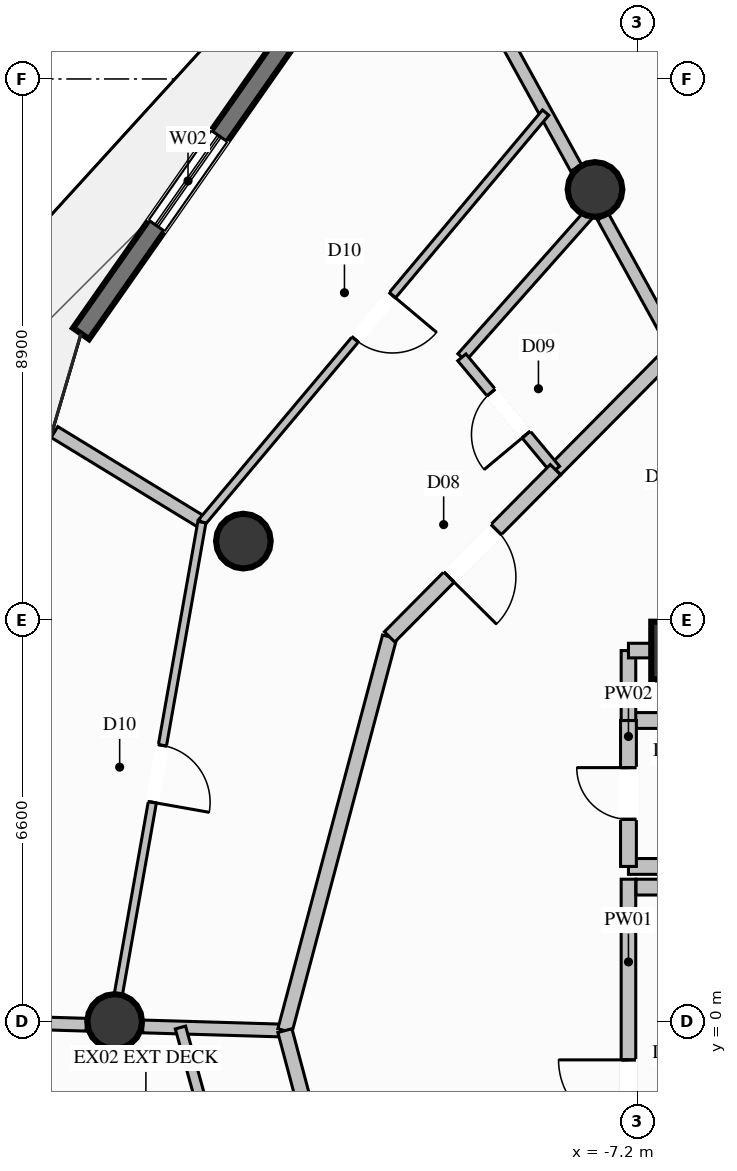
"""IFC4 building model, lengths in metres.
Left out: names, types, materials, properties, quantities, classifications, styles, units other than length and angle.
Written with IfcOpenShell. Run it as: python <this file> out.ifc"""

import sys

from ifc_helpers import new_model, si_unit, direction, frame, frame_2d, origin, origin_2d, place, context, subcontext, project, spatial, rectangle, circle, extrude, element, fill, save


model = new_model("IFC4")
c1 = context("Model", 3, precision=1e-05, world=origin(), true_north=direction((0.0, 1.0)))
c2 = subcontext(c1, "Body", "Model", "MODEL_VIEW")
j1 = project(units=[si_unit("LENGTHUNIT", "METRE"), si_unit("PLANEANGLEUNIT", "RADIAN")], contexts=[c1])
p1 = place(None, origin())
s1 = spatial("IfcSite", under=j1, at=p1, CompositionType="ELEMENT")
p2 = place(p1, origin())
s2 = spatial("IfcBuilding", under=s1, at=p2, CompositionType="ELEMENT")
p3 = place(p2, frame((0.0, 0.0, 205.6)))
s3 = spatial("IfcBuildingStorey", under=s2, at=p3, CompositionType="ELEMENT", Elevation=205.6)
p4 = place(p3, frame((-6.5, 6.1, 0.0), z_axis=(0.0, 0.0, 1.0), x_axis=(1.0, 0.0, 0.0)))
e1 = element("IfcColumn", 1, at=p4, inside=s3, PredefinedType="COLUMN", context=c2, shape_type="SweptSolid", body=[
    extrude(rectangle(XDim=0.95, YDim=0.95, at=origin_2d()), origin(), (0.0, 0.0, 1.0), 3.6),
])
for number, where, z_axis, x_axis in (
    (2, (-7.9, 13.683, 0.0), (0.0, 0.0, 1.0), (1.0, 0.0, 0.0)),
    (3, (-13.683, 7.9, 0.0), (0.0, 0.0, 1.0), (1.0, 0.0, 0.0)),
    (4, (-15.8, 0.0, 0.0), (0.0, 0.0, 1.0), (1.0, 0.0, 0.0)),
):
    element("IfcColumn", number, at=place(p3, frame(where, z_axis=z_axis, x_axis=x_axis)), inside=s3, PredefinedType="COLUMN", context=c2, shape_type="SweptSolid", body=[
        extrude(circle(Radius=0.45, at=origin_2d()), origin(), (0.0, 0.0, 1.0), 3.6),
    ])
p5 = place(p3, frame((-16.353, 11.313, 0.0), z_axis=(0.0, 0.0, 1.0), x_axis=(0.573863076695, 0.818951261802, 0.0)))
e5 = element("IfcWall", 5, at=p5, inside=s3, PredefinedType="SOLIDWALL", context=c2, shape_type="SweptSolid", body=[
    extrude(rectangle(XDim=6.132, YDim=0.32, at=frame_2d((3.066, 0.0))), origin(), (0.0, 0.0, 1.0), 3.36),
])
p6 = place(p5, frame((2.166, 0.0, 0.35)))
e6 = element("IfcOpeningElement", 6, at=p6, cuts=e5, PredefinedType="OPENING", context=c2, shape_type="SweptSolid", body=[
    extrude(rectangle(XDim=1.8, YDim=2.6, at=frame_2d((0.9, 1.3))), frame((0.0, 0.17, 0.0), z_axis=(0.0, -1.0, 0.0), x_axis=(1.0, 0.0, 0.0)), (0.0, 0.0, 1.0), 0.34),
])
p7 = place(p3, frame((-7.35, -3.38, 0.0), z_axis=(0.0, 0.0, 1.0), x_axis=(0.0, 1.0, 0.0)))
e7 = element("IfcWall", 7, at=p7, inside=s3, PredefinedType="PARTITIONING", context=c2, shape_type="SweptSolid", body=[
    extrude(rectangle(XDim=5.72, YDim=0.24, at=frame_2d((2.86, 0.0))), origin(), (0.0, 0.0, 1.0), 2.445),
])
p8 = place(p7, frame((1.599, 0.0, 0.0)))
e8 = element("IfcOpeningElement", 8, at=p8, cuts=e7, PredefinedType="OPENING", context=c2, shape_type="SweptSolid", body=[
    extrude(rectangle(XDim=1.15, YDim=2.2, at=frame_2d((0.575, 1.1))), frame((0.0, 0.13, 0.0), z_axis=(0.0, -1.0, 0.0), x_axis=(1.0, 0.0, 0.0)), (0.0, 0.0, 1.0), 0.26),
])
p9 = place(p3, frame((-7.225, 2.21, 0.0), z_axis=(0.0, 0.0, 1.0), x_axis=(1.0, 0.0, 0.0)))
e9 = element("IfcWall", 9, at=p9, inside=s3, PredefinedType="PARTITIONING", context=c2, shape_type="SweptSolid", body=[
    extrude(rectangle(XDim=0.875, YDim=0.26, at=frame_2d((0.438, 0.0))), origin(), (0.0, 0.0, 1.0), 3.36),
])
for number, where, z_axis, x_axis in (
    (10, (-7.35, 4.95, 0.0), (0.0, 0.0, 1.0), (1.0, 0.0, 0.0)),
    (11, (-7.35, 2.55, 0.0), (0.0, 0.0, 1.0), (1.0, 0.0, 0.0)),
):
    element("IfcWall", number, at=place(p3, frame(where, z_axis=z_axis, x_axis=x_axis)), inside=s3, PredefinedType="PARTITIONING", context=c2, shape_type="SweptSolid", body=[
        extrude(rectangle(XDim=0.93, YDim=0.26, at=frame_2d((0.465, 0.0))), origin(), (0.0, 0.0, 1.0), 3.36),
    ])
p10 = place(p3, frame((-7.35, 2.55, 0.0), z_axis=(0.0, 0.0, 1.0), x_axis=(0.0, 1.0, 0.0)))
e12 = element("IfcWall", 12, at=p10, inside=s3, PredefinedType="PARTITIONING", context=c2, shape_type="SweptSolid", body=[
    extrude(rectangle(XDim=2.4, YDim=0.26, at=frame_2d((1.2, 0.0))), origin(), (0.0, 0.0, 1.0), 2.445),
])
p11 = place(p10, frame((0.775, 0.0, 0.0)))
e13 = element("IfcOpeningElement", 13, at=p11, cuts=e12, PredefinedType="OPENING", context=c2, shape_type="SweptSolid", body=[
    extrude(rectangle(XDim=0.85, YDim=2.05, at=frame_2d((0.425, 1.025))), frame((0.0, 0.14, 0.0), z_axis=(0.0, -1.0, 0.0), x_axis=(1.0, 0.0, 0.0)), (0.0, 0.0, 1.0), 0.28),
])
p12 = place(p3, frame((-7.35, 4.95, 0.0), z_axis=(0.0, 0.0, 1.0), x_axis=(0.0, 1.0, 0.0)))
e14 = element("IfcWall", 14, at=p12, inside=s3, PredefinedType="PARTITIONING", context=c2, shape_type="SweptSolid", body=[
    extrude(rectangle(XDim=1.15, YDim=0.24, at=frame_2d((0.575, 0.0))), origin(), (0.0, 0.0, 1.0), 2.445),
])
p13 = place(p3, frame((-7.35, 6.1, 0.0), z_axis=(0.0, 0.0, 1.0), x_axis=(1.0, 0.0, 0.0)))
e15 = element("IfcWall", 15, at=p13, inside=s3, PredefinedType="PARTITIONING", context=c2, shape_type="SweptSolid", body=[
    extrude(rectangle(XDim=0.85, YDim=0.24, at=frame_2d((0.425, 0.0))), origin(), (0.0, 0.0, 1.0), 2.877),
])
p14 = place(p3, frame((-6.575, 11.065, 0.0), z_axis=(0.0, 0.0, 1.0), x_axis=(-0.482312715348, 0.875999112222, 0.0)))
e16 = element("IfcWall", 16, at=p14, inside=s3, PredefinedType="PARTITIONING", context=c2, shape_type="SweptSolid", body=[
    extrude(rectangle(XDim=2.474, YDim=0.21, at=frame_2d((1.237, 0.0))), origin(), (0.0, 0.0, 1.0), 2.877),
])
p15 = place(p3, frame((-8.21, 14.036, 0.0), z_axis=(0.0, 0.0, 1.0), x_axis=(-0.482343563711, 0.875982126842, 0.0)))
e17 = element("IfcWall", 17, at=p15, inside=s3, PredefinedType="PARTITIONING", context=c2, shape_type="SweptSolid", body=[
    extrude(rectangle(XDim=4.522, YDim=0.21, at=frame_2d((2.261, 0.0))), origin(), (0.0, 0.0, 1.0), 3.36),
])
p16 = place(p3, frame((-13.0, -0.15, 0.0), z_axis=(0.0, 0.0, 1.0), x_axis=(-0.999566309164, 0.029448150771, 0.0)))
e18 = element("IfcWall", 18, at=p16, inside=s3, PredefinedType="PARTITIONING", context=c2, shape_type="SweptSolid", body=[
    extrude(rectangle(XDim=2.338, YDim=0.21, at=frame_2d((1.169, 0.0))), origin(), (0.0, 0.0, 1.0), 3.36),
])
p17 = place(p3, frame((-16.267, -0.053, 0.0), z_axis=(0.0, 0.0, 1.0), x_axis=(-0.999560281957, 0.029652027503, 0.0)))
e19 = element("IfcWall", 19, at=p17, inside=s3, PredefinedType="PARTITIONING", context=c2, shape_type="SweptSolid", body=[
    extrude(rectangle(XDim=1.787, YDim=0.21, at=frame_2d((0.893, 0.0))), origin(), (0.0, 0.0, 1.0), 3.36),
])
p18 = place(p3, frame((-6.575, 11.065, 0.0), z_axis=(0.0, 0.0, 1.0), x_axis=(-0.704271845888, -0.709930395947, 0.0)))
e20 = element("IfcWall", 20, at=p18, inside=s3, PredefinedType="PARTITIONING", context=c2, shape_type="SweptSolid", body=[
    extrude(rectangle(XDim=2.804, YDim=0.24, at=frame_2d((1.402, 0.0))), origin(), (0.0, 0.0, 1.0), 3.36),
])
p19 = place(p3, frame((-7.872, 13.422, 0.0), z_axis=(0.0, 0.0, 1.0), x_axis=(-0.663660752153, -0.748033693126, 0.0)))
e21 = element("IfcWall", 21, at=p19, inside=s3, PredefinedType="PLUMBINGWALL", context=c2, shape_type="SweptSolid", body=[
    extrude(rectangle(XDim=3.342, YDim=0.175, at=frame_2d((1.671, 0.0))), origin(), (0.0, 0.0, 1.0), 2.929),
])
p20 = place(p3, frame((-8.55, 9.074, 0.0), z_axis=(0.0, 0.0, 1.0), x_axis=(-0.640164435278, 0.768237916147, 0.0)))
e22 = element("IfcWall", 22, at=p20, inside=s3, PredefinedType="PLUMBINGWALL", context=c2, shape_type="SweptSolid", body=[
    extrude(rectangle(XDim=2.406, YDim=0.175, at=frame_2d((1.203, 0.0))), origin(), (0.0, 0.0, 1.0), 3.36),
])
p21 = place(p20, frame((0.753, 0.0, 0.0)))
e23 = element("IfcOpeningElement", 23, at=p21, cuts=e22, PredefinedType="OPENING", context=c2, shape_type="SweptSolid", body=[
    extrude(rectangle(XDim=0.9, YDim=2.1, at=frame_2d((0.45, 1.05))), frame((0.0, 0.098, 0.0), z_axis=(0.0, -1.0, 0.0), x_axis=(1.0, 0.0, 0.0)), (0.0, 0.0, 1.0), 0.195),
])
p22 = place(p3, frame((-14.365, 8.212, 0.0), z_axis=(0.0, 0.0, 1.0), x_axis=(-0.853249981301, 0.521502127905, 0.0)))
e24 = element("IfcWall", 24, at=p22, inside=s3, PredefinedType="PARTITIONING", context=c2, shape_type="SweptSolid", body=[
    extrude(rectangle(XDim=2.842, YDim=0.21, at=frame_2d((1.421, 0.0))), origin(), (0.0, 0.0, 1.0), 3.36),
])
p23 = place(p3, frame((-11.278, 6.325, 0.0), z_axis=(0.0, 0.0, 1.0), x_axis=(-0.257007135557, -0.966409505475, 0.0)))
e25 = element("IfcWall", 25, at=p23, inside=s3, PredefinedType="PARTITIONING", context=c2, shape_type="SweptSolid", body=[
    extrude(rectangle(XDim=6.7, YDim=0.24, at=frame_2d((3.35, 0.0))), origin(), (0.0, 0.0, 1.0), 3.36),
])
p24 = place(p3, frame((-8.55, 9.074, 0.0), z_axis=(0.0, 0.0, 1.0), x_axis=(-0.704390934975, -0.709812236246, 0.0)))
e26 = element("IfcWall", 26, at=p24, inside=s3, PredefinedType="PARTITIONING", context=c2, shape_type="SweptSolid", body=[
    extrude(rectangle(XDim=3.873, YDim=0.24, at=frame_2d((1.937, 0.0))), origin(), (0.0, 0.0, 1.0), 3.36),
])
p25 = place(p24, frame((1.386, 0.0, 0.0)))
e27 = element("IfcOpeningElement", 27, at=p25, cuts=e26, PredefinedType="OPENING", context=c2, shape_type="SweptSolid", body=[
    extrude(rectangle(XDim=1.1, YDim=2.3, at=frame_2d((0.55, 1.15))), frame((0.0, 0.13, 0.0), z_axis=(0.0, -1.0, 0.0), x_axis=(1.0, 0.0, 0.0)), (0.0, 0.0, 1.0), 0.26),
])
p26 = place(p3, frame((-8.712, 14.947, 0.0), z_axis=(0.0, 0.0, 1.0), x_axis=(-0.642897719882, -0.765952036208, 0.0)))
e28 = element("IfcWall", 28, at=p26, inside=s3, PredefinedType="PARTITIONING", context=c2, shape_type="SweptSolid", body=[
    extrude(rectangle(XDim=8.793, YDim=0.135, at=frame_2d((4.396, 0.0))), origin(), (0.0, 0.0, 1.0), 3.36),
])
p27 = place(p26, frame((3.921, 0.0, 0.0)))
e29 = element("IfcOpeningElement", 29, at=p27, cuts=e28, PredefinedType="OPENING", context=c2, shape_type="SweptSolid", body=[
    extrude(rectangle(XDim=0.95, YDim=2.1, at=frame_2d((0.475, 1.05))), frame((0.0, 0.078, 0.0), z_axis=(0.0, -1.0, 0.0), x_axis=(1.0, 0.0, 0.0)), (0.0, 0.0, 1.0), 0.155),
])
p28 = place(p3, frame((-14.365, 8.212, 0.0), z_axis=(0.0, 0.0, 1.0), x_axis=(-0.174280681656, -0.984696016038, 0.0)))
e30 = element("IfcWall", 30, at=p28, inside=s3, PredefinedType="PARTITIONING", context=c2, shape_type="SweptSolid", body=[
    extrude(rectangle(XDim=8.406, YDim=0.135, at=frame_2d((4.203, 0.0))), origin(), (0.0, 0.0, 1.0), 2.929),
])
p29 = place(p28, frame((3.728, 0.0, 0.0)))
e31 = element("IfcOpeningElement", 31, at=p29, cuts=e30, PredefinedType="OPENING", context=c2, shape_type="SweptSolid", body=[
    extrude(rectangle(XDim=0.95, YDim=2.1, at=frame_2d((0.475, 1.05))), frame((0.0, 0.078, 0.0), z_axis=(0.0, -1.0, 0.0), x_axis=(1.0, 0.0, 0.0)), (0.0, 0.0, 1.0), 0.155),
])
p30 = place(p3, frame((-13.0, -0.15, 0.0), z_axis=(0.0, 0.0, 1.0), x_axis=(0.256944245483, -0.966426228283, 0.0)))
e32 = element("IfcWall", 32, at=p30, inside=s3, PredefinedType="PARTITIONING", context=c2, shape_type="SweptSolid", body=[
    extrude(rectangle(XDim=2.813, YDim=0.24, at=frame_2d((1.407, 0.0))), origin(), (0.0, 0.0, 1.0), 3.36),
])
p31 = place(p3, frame((-14.718, -0.099, 0.0), z_axis=(0.0, 0.0, 1.0), x_axis=(0.267034684906, -0.963686918588, 0.0)))
e33 = element("IfcWall", 33, at=p31, inside=s3, PredefinedType="PLUMBINGWALL", context=c2, shape_type="SweptSolid", body=[
    extrude(rectangle(XDim=3.184, YDim=0.175, at=frame_2d((1.592, 0.0))), origin(), (0.0, 0.0, 1.0), 3.36),
])
p32 = place(p6, origin())
e34 = element("IfcWindow", 34, at=p32, inside=s3, PartitioningType="SINGLE_PANEL", PredefinedType="WINDOW", context=c2, shape_type="SweptSolid", body=[
    extrude(rectangle(XDim=1.8, YDim=2.6, at=frame_2d((0.9, 1.3))), frame((0.0, 0.03, 0.0), z_axis=(0.0, -1.0, 0.0), x_axis=(1.0, 0.0, 0.0)), (0.0, 0.0, 1.0), 0.06),
])
fill(e6, e34)
p33 = place(p8, origin())
e35 = element("IfcDoor", 35, at=p33, inside=s3, OperationType="SINGLE_SWING_RIGHT", PredefinedType="DOOR", context=c2, shape_type="SweptSolid", body=[
    extrude(rectangle(XDim=1.15, YDim=2.2, at=frame_2d((0.575, 1.1))), frame((0.0, 0.025, 0.0), z_axis=(0.0, -1.0, 0.0), x_axis=(1.0, 0.0, 0.0)), (0.0, 0.0, 1.0), 0.05),
])
fill(e8, e35)
p34 = place(p11, origin())
e36 = element("IfcDoor", 36, at=p34, inside=s3, OperationType="SINGLE_SWING_RIGHT", PredefinedType="DOOR", context=c2, shape_type="SweptSolid", body=[
    extrude(rectangle(XDim=0.85, YDim=2.05, at=frame_2d((0.425, 1.025))), frame((0.0, 0.025, 0.0), z_axis=(0.0, -1.0, 0.0), x_axis=(1.0, 0.0, 0.0)), (0.0, 0.0, 1.0), 0.05),
])
fill(e13, e36)
p35 = place(p21, origin())
e37 = element("IfcDoor", 37, at=p35, inside=s3, OperationType="SINGLE_SWING_LEFT", PredefinedType="DOOR", context=c2, shape_type="SweptSolid", body=[
    extrude(rectangle(XDim=0.9, YDim=2.1, at=frame_2d((0.45, 1.05))), frame((0.0, 0.025, 0.0), z_axis=(0.0, -1.0, 0.0), x_axis=(1.0, 0.0, 0.0)), (0.0, 0.0, 1.0), 0.05),
])
fill(e23, e37)
p36 = place(p25, origin())
e38 = element("IfcDoor", 38, at=p36, inside=s3, OperationType="SINGLE_SWING_RIGHT", PredefinedType="DOOR", context=c2, shape_type="SweptSolid", body=[
    extrude(rectangle(XDim=1.1, YDim=2.3, at=frame_2d((0.55, 1.15))), frame((0.0, 0.025, 0.0), z_axis=(0.0, -1.0, 0.0), x_axis=(1.0, 0.0, 0.0)), (0.0, 0.0, 1.0), 0.05),
])
fill(e27, e38)
p37 = place(p27, origin())
e39 = element("IfcDoor", 39, at=p37, inside=s3, OperationType="SINGLE_SWING_LEFT", PredefinedType="DOOR", context=c2, shape_type="SweptSolid", body=[
    extrude(rectangle(XDim=0.95, YDim=2.1, at=frame_2d((0.475, 1.05))), frame((0.0, 0.025, 0.0), z_axis=(0.0, -1.0, 0.0), x_axis=(1.0, 0.0, 0.0)), (0.0, 0.0, 1.0), 0.05),
])
fill(e29, e39)
p38 = place(p29, origin())
e40 = element("IfcDoor", 40, at=p38, inside=s3, OperationType="SINGLE_SWING_RIGHT", PredefinedType="DOOR", context=c2, shape_type="SweptSolid", body=[
    extrude(rectangle(XDim=0.95, YDim=2.1, at=frame_2d((0.475, 1.05))), frame((0.0, 0.025, 0.0), z_axis=(0.0, -1.0, 0.0), x_axis=(1.0, 0.0, 0.0)), (0.0, 0.0, 1.0), 0.05),
])
fill(e31, e40)
save(model, sys.argv[1])
